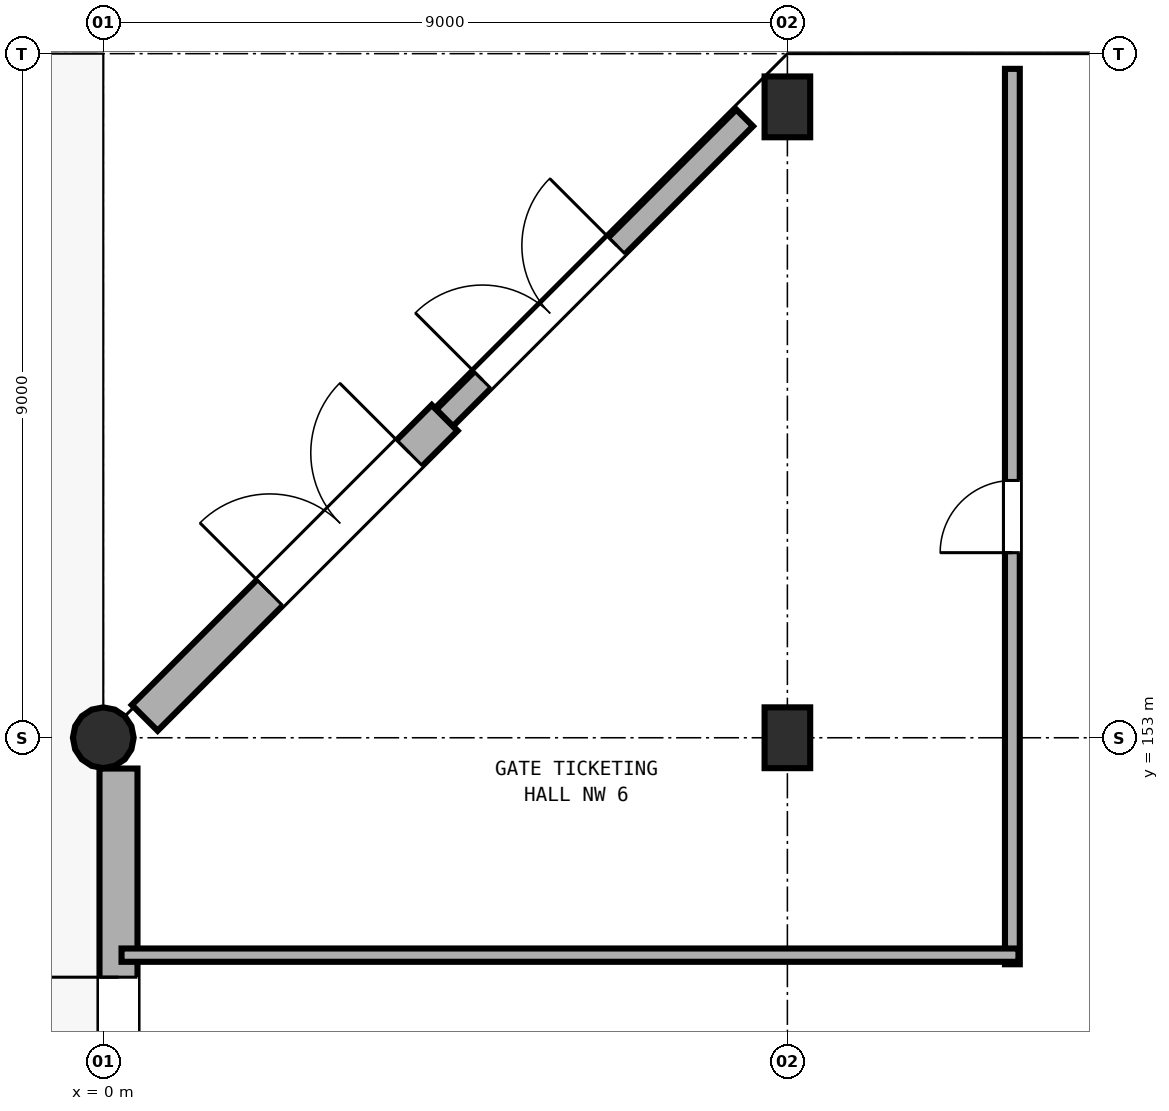
"""IFC4 building model, lengths in metres.
Left out: names, types, materials, properties, quantities, classifications, styles, units other than length and angle.
Written with IfcOpenShell. Run it as: python <this file> out.ifc"""

import sys

from ifc_helpers import new_model, si_unit, direction, frame, frame_2d, origin, origin_2d, place, context, subcontext, project, spatial, rectangle, circle, extrude, element, fill, save


model = new_model("IFC4")
c1 = context("Model", 3, precision=1e-05, world=origin(), true_north=direction((0.0, 1.0)))
c2 = subcontext(c1, "Body", "Model", "MODEL_VIEW")
j1 = project(units=[si_unit("LENGTHUNIT", "METRE"), si_unit("PLANEANGLEUNIT", "RADIAN")], contexts=[c1])
p1 = place(None, origin())
s1 = spatial("IfcSite", under=j1, at=p1, CompositionType="ELEMENT")
p2 = place(p1, origin())
s2 = spatial("IfcBuilding", under=s1, at=p2, CompositionType="ELEMENT")
p3 = place(p2, origin())
s3 = spatial("IfcBuildingStorey", under=s2, at=p3, CompositionType="ELEMENT", Elevation=0.0)
p4 = place(p3, frame((0.0, 153.0, 0.0), z_axis=(0.0, 0.0, 1.0), x_axis=(1.0, 0.0, 0.0)))
e1 = element("IfcColumn", 1, at=p4, inside=s3, PredefinedType="COLUMN", context=c2, shape_type="SweptSolid", body=[
    extrude(circle(Radius=0.4, at=origin_2d()), origin(), (0.0, 0.0, 1.0), 4.8),
])
for number, where, z_axis, x_axis in (
    (2, (9.0, 153.0, 0.0), (0.0, 0.0, 1.0), (1.0, 0.0, 0.0)),
    (3, (9.0, 161.3, 0.0), (0.0, 0.0, 1.0), (1.0, 0.0, 0.0)),
):
    element("IfcColumn", number, at=place(p3, frame(where, z_axis=z_axis, x_axis=x_axis)), inside=s3, PredefinedType="COLUMN", context=c2, shape_type="SweptSolid", body=[
        extrude(rectangle(XDim=0.6, YDim=0.8, at=origin_2d()), origin(), (0.0, 0.0, 1.0), 4.8),
    ])
p5 = place(p3, frame((0.2, 144.405, 0.0), z_axis=(0.0, 0.0, 1.0), x_axis=(0.0, 1.0, 0.0)))
e4 = element("IfcWall", 4, at=p5, inside=s3, PredefinedType="SOLIDWALL", context=c2, shape_type="SweptSolid", body=[
    extrude(rectangle(XDim=8.19, YDim=0.5, at=frame_2d((4.095, 0.0))), origin(), (0.0, 0.0, 1.0), 3.58),
])
p6 = place(p5, frame((2.745, 0.0, 0.0)))
e5 = element("IfcOpeningElement", 5, at=p6, cuts=e4, PredefinedType="OPENING", context=c2, shape_type="SweptSolid", body=[
    extrude(rectangle(XDim=2.7, YDim=2.4, at=frame_2d((1.35, 1.2))), frame((0.0, 0.26, 0.0), z_axis=(0.0, -1.0, 0.0), x_axis=(1.0, 0.0, 0.0)), (0.0, 0.0, 1.0), 0.52),
])
p7 = place(p3, frame((0.545, 153.262, 0.0), z_axis=(0.0, 0.0, 1.0), x_axis=(0.7071286530614815, 0.7070849086350626, 0.0)))
e6 = element("IfcWall", 6, at=p7, inside=s3, PredefinedType="SOLIDWALL", context=c2, shape_type="SweptSolid", body=[
    extrude(rectangle(XDim=5.581, YDim=0.48, at=frame_2d((2.791, 0.0))), origin(), (0.0, 0.0, 1.0), 3.58),
])
p8 = place(p7, frame((2.328, 0.0, 0.0)))
e7 = element("IfcOpeningElement", 7, at=p8, cuts=e6, PredefinedType="OPENING", context=c2, shape_type="SweptSolid", body=[
    extrude(rectangle(XDim=2.6, YDim=2.35, at=frame_2d((1.3, 1.175))), frame((0.0, 0.25, 0.0), z_axis=(0.0, -1.0, 0.0), x_axis=(1.0, 0.0, 0.0)), (0.0, 0.0, 1.0), 0.5),
])
p9 = place(p3, frame((4.491, 157.208, 0.0), z_axis=(0.0, 0.0, 1.0), x_axis=(0.7071067811865476, 0.7071067811865476, 0.0)))
e8 = element("IfcWall", 8, at=p9, inside=s3, PredefinedType="SOLIDWALL", context=c2, shape_type="SweptSolid", body=[
    extrude(rectangle(XDim=5.581, YDim=0.31, at=frame_2d((2.791, 0.0))), origin(), (0.0, 0.0, 1.0), 3.58),
])
p10 = place(p9, frame((0.703, 0.0, 0.0)))
e9 = element("IfcOpeningElement", 9, at=p10, cuts=e8, PredefinedType="OPENING", context=c2, shape_type="SweptSolid", body=[
    extrude(rectangle(XDim=2.5, YDim=2.35, at=frame_2d((1.25, 1.175))), frame((0.0, 0.165, 0.0), z_axis=(0.0, -1.0, 0.0), x_axis=(1.0, 0.0, 0.0)), (0.0, 0.0, 1.0), 0.33),
])
p11 = place(p3, frame((9.305, 161.8, 0.0), z_axis=(0.0, 0.0, 1.0), x_axis=(1.0, 0.0, 0.0)))
e10 = element("IfcWall", 10, at=p11, inside=s3, PredefinedType="SOLIDWALL", context=c2, shape_type="SweptSolid", body=[
    extrude(rectangle(XDim=8.39, YDim=0.29, at=frame_2d((4.195, 0.0))), origin(), (0.0, 0.0, 1.0), 3.58),
])
p12 = place(p11, frame((2.97, 0.0, 0.0)))
e11 = element("IfcOpeningElement", 11, at=p12, cuts=e10, PredefinedType="OPENING", context=c2, shape_type="SweptSolid", body=[
    extrude(rectangle(XDim=2.45, YDim=2.2, at=frame_2d((1.225, 1.1))), frame((0.0, 0.155, 0.0), z_axis=(0.0, -1.0, 0.0), x_axis=(1.0, 0.0, 0.0)), (0.0, 0.0, 1.0), 0.31),
])
p13 = place(p3, frame((11.96, 150.02, 0.0), z_axis=(0.0, 0.0, 1.0), x_axis=(0.0, 1.0, 0.0)))
e12 = element("IfcWall", 12, at=p13, inside=s3, PredefinedType="PARTITIONING", context=c2, shape_type="SweptSolid", body=[
    extrude(rectangle(XDim=11.78, YDim=0.195, at=frame_2d((5.89, 0.0))), origin(), (0.0, 0.0, 1.0), 3.28),
])
p14 = place(p13, frame((5.415, 0.0, 0.0)))
e13 = element("IfcOpeningElement", 13, at=p14, cuts=e12, PredefinedType="OPENING", context=c2, shape_type="SweptSolid", body=[
    extrude(rectangle(XDim=0.95, YDim=2.18, at=frame_2d((0.475, 1.09))), frame((0.0, 0.107, 0.0), z_axis=(0.0, -1.0, 0.0), x_axis=(1.0, 0.0, 0.0)), (0.0, 0.0, 1.0), 0.215),
])
p15 = place(p3, frame((12.04, 150.14, 0.0), z_axis=(0.0, 0.0, 1.0), x_axis=(-1.0, 0.0, 0.0)))
e14 = element("IfcWall", 14, at=p15, inside=s3, PredefinedType="PARTITIONING", context=c2, shape_type="SweptSolid", body=[
    extrude(rectangle(XDim=11.8, YDim=0.175, at=frame_2d((5.9, 0.0))), origin(), (0.0, 0.0, 1.0), 3.28),
])
p16 = place(p6, origin())
e15 = element("IfcDoor", 15, at=p16, inside=s3, OperationType="DOUBLE_DOOR_SINGLE_SWING", PredefinedType="DOOR", context=c2, shape_type="SweptSolid", body=[
    extrude(rectangle(XDim=2.7, YDim=2.4, at=frame_2d((1.35, 1.2))), frame((0.0, 0.025, 0.0), z_axis=(0.0, -1.0, 0.0), x_axis=(1.0, 0.0, 0.0)), (0.0, 0.0, 1.0), 0.05),
])
fill(e5, e15)
p17 = place(p8, origin())
e16 = element("IfcDoor", 16, at=p17, inside=s3, OperationType="DOUBLE_DOOR_SINGLE_SWING", PredefinedType="DOOR", context=c2, shape_type="SweptSolid", body=[
    extrude(rectangle(XDim=2.6, YDim=2.35, at=frame_2d((1.3, 1.175))), frame((0.0, 0.025, 0.0), z_axis=(0.0, -1.0, 0.0), x_axis=(1.0, 0.0, 0.0)), (0.0, 0.0, 1.0), 0.05),
])
fill(e7, e16)
p18 = place(p10, origin())
e17 = element("IfcDoor", 17, at=p18, inside=s3, OperationType="DOUBLE_DOOR_SINGLE_SWING", PredefinedType="DOOR", context=c2, shape_type="SweptSolid", body=[
    extrude(rectangle(XDim=2.5, YDim=2.35, at=frame_2d((1.25, 1.175))), frame((0.0, 0.025, 0.0), z_axis=(0.0, -1.0, 0.0), x_axis=(1.0, 0.0, 0.0)), (0.0, 0.0, 1.0), 0.05),
])
fill(e9, e17)
p19 = place(p12, origin())
e18 = element("IfcDoor", 18, at=p19, inside=s3, OperationType="DOUBLE_DOOR_SINGLE_SWING", PredefinedType="GATE", context=c2, shape_type="SweptSolid", body=[
    extrude(rectangle(XDim=2.45, YDim=2.2, at=frame_2d((1.225, 1.1))), frame((0.0, 0.025, 0.0), z_axis=(0.0, -1.0, 0.0), x_axis=(1.0, 0.0, 0.0)), (0.0, 0.0, 1.0), 0.05),
])
fill(e11, e18)
p20 = place(p14, origin())
e19 = element("IfcDoor", 19, at=p20, inside=s3, OperationType="SINGLE_SWING_LEFT", PredefinedType="DOOR", context=c2, shape_type="SweptSolid", body=[
    extrude(rectangle(XDim=0.95, YDim=2.18, at=frame_2d((0.475, 1.09))), frame((0.0, 0.025, 0.0), z_axis=(0.0, -1.0, 0.0), x_axis=(1.0, 0.0, 0.0)), (0.0, 0.0, 1.0), 0.05),
])
fill(e13, e19)
save(model, sys.argv[1])
